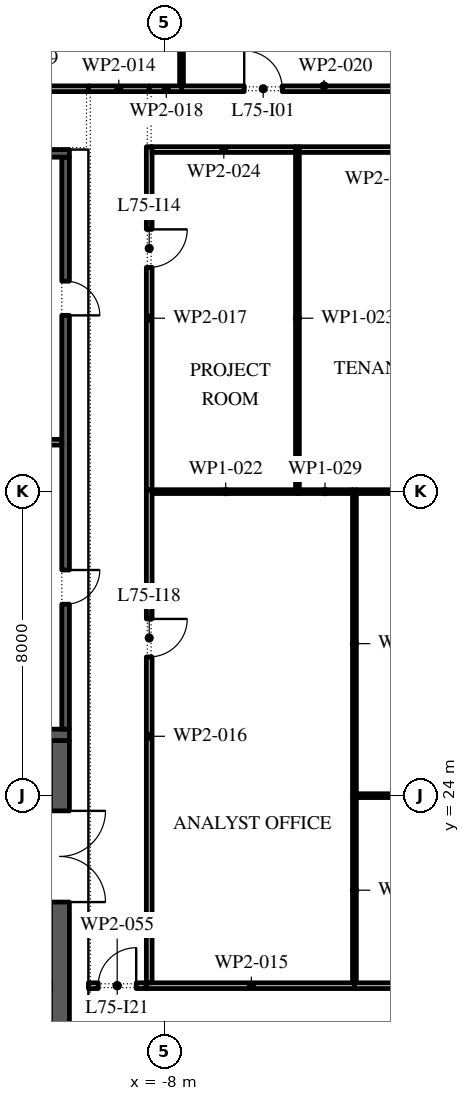
"""IFC4 building model, lengths in metres.
Left out: names, types, materials, properties, quantities, classifications, styles, units other than length and angle.
Written with IfcOpenShell. Run it as: python <this file> out.ifc"""

import sys

from ifc_helpers import new_model, si_unit, direction, frame, frame_2d, origin, place, context, subcontext, project, spatial, rectangle, extrude, element, fill, save


model = new_model("IFC4")
c1 = context("Model", 3, precision=1e-05, world=origin(), true_north=direction((0.0, 1.0)))
c2 = subcontext(c1, "Body", "Model", "MODEL_VIEW")
j1 = project(units=[si_unit("LENGTHUNIT", "METRE"), si_unit("PLANEANGLEUNIT", "RADIAN")], contexts=[c1])
p1 = place(None, origin())
s1 = spatial("IfcSite", under=j1, at=p1, CompositionType="ELEMENT")
p2 = place(p1, origin())
s2 = spatial("IfcBuilding", under=s1, at=p2, CompositionType="ELEMENT")
p3 = place(p2, frame((0.0, 0.0, 342.6)))
s3 = spatial("IfcBuildingStorey", under=s2, at=p3, CompositionType="ELEMENT", Elevation=342.6)
p4 = place(p3, frame((-10.75, -2.45, 0.0), z_axis=(0.0, 0.0, 1.0), x_axis=(0.0, 1.0, 0.0)))
e1 = element("IfcWall", 1, at=p4, inside=s3, PredefinedType="SHEAR", context=c2, shape_type="SweptSolid", body=[
    extrude(rectangle(XDim=27.9, YDim=0.5, at=frame_2d((13.95, 0.0))), origin(), (0.0, 0.0, 1.0), 4.0),
])
p5 = place(p4, frame((23.65, 0.0, 0.0)))
e2 = element("IfcOpeningElement", 2, at=p5, cuts=e1, PredefinedType="OPENING", context=c2, shape_type="SweptSolid", body=[
    extrude(rectangle(XDim=2.4, YDim=2.1, at=frame_2d((1.2, 1.05))), frame((0.0, 0.26, 0.0), z_axis=(0.0, -1.0, 0.0), x_axis=(1.0, 0.0, 0.0)), (0.0, 0.0, 1.0), 0.52),
])
p6 = place(p4, frame((1.087, 0.0, 0.0)))
e3 = element("IfcOpeningElement", 3, at=p6, cuts=e1, PredefinedType="OPENING", context=c2, shape_type="SweptSolid", body=[
    extrude(rectangle(XDim=0.9, YDim=2.1, at=frame_2d((0.45, 1.05))), frame((0.0, 0.26, 0.0), z_axis=(0.0, -1.0, 0.0), x_axis=(1.0, 0.0, 0.0)), (0.0, 0.0, 1.0), 0.52),
])
p7 = place(p4, frame((4.262, 0.0, 0.0)))
e4 = element("IfcOpeningElement", 4, at=p7, cuts=e1, PredefinedType="OPENING", context=c2, shape_type="SweptSolid", body=[
    extrude(rectangle(XDim=1.0, YDim=2.1, at=frame_2d((0.5, 1.05))), frame((0.0, 0.26, 0.0), z_axis=(0.0, -1.0, 0.0), x_axis=(1.0, 0.0, 0.0)), (0.0, 0.0, 1.0), 0.52),
])
p8 = place(p3, frame((-21.5, 25.6, 0.0), z_axis=(0.0, 0.0, 1.0), x_axis=(1.0, 0.0, 0.0)))
e5 = element("IfcWall", 5, at=p8, inside=s3, PredefinedType="SHEAR", context=c2, shape_type="SweptSolid", body=[
    extrude(rectangle(XDim=11.0, YDim=0.3, at=frame_2d((5.5, 0.0))), origin(), (0.0, 0.0, 1.0), 4.0),
])
p9 = place(p3, frame((-10.6, 25.75, 0.0), z_axis=(0.0, 0.0, 1.0), x_axis=(0.0, 1.0, 0.0)))
e6 = element("IfcWall", 6, at=p9, inside=s3, PredefinedType="SHEAR", context=c2, shape_type="SweptSolid", body=[
    extrude(rectangle(XDim=15.05, YDim=0.2, at=frame_2d((7.525, 0.0))), origin(), (0.0, 0.0, 1.0), 4.0),
])
p10 = place(p9, frame((3.288, 0.0, 0.0)))
e7 = element("IfcOpeningElement", 7, at=p10, cuts=e6, PredefinedType="OPENING", context=c2, shape_type="SweptSolid", body=[
    extrude(rectangle(XDim=0.9, YDim=2.1, at=frame_2d((0.45, 1.05))), frame((0.0, 0.11, 0.0), z_axis=(0.0, -1.0, 0.0), x_axis=(1.0, 0.0, 0.0)), (0.0, 0.0, 1.0), 0.22),
])
p11 = place(p9, frame((10.887, 0.0, 0.0)))
e8 = element("IfcOpeningElement", 8, at=p11, cuts=e6, PredefinedType="OPENING", context=c2, shape_type="SweptSolid", body=[
    extrude(rectangle(XDim=0.9, YDim=2.1, at=frame_2d((0.45, 1.05))), frame((0.0, 0.11, 0.0), z_axis=(0.0, -1.0, 0.0), x_axis=(1.0, 0.0, 0.0)), (0.0, 0.0, 1.0), 0.22),
])
p12 = place(p3, frame((-21.5, 40.9, 0.0), z_axis=(0.0, 0.0, 1.0), x_axis=(1.0, 0.0, 0.0)))
e9 = element("IfcWall", 9, at=p12, inside=s3, PredefinedType="SHEAR", context=c2, shape_type="SweptSolid", body=[
    extrude(rectangle(XDim=11.0, YDim=0.2, at=frame_2d((5.5, 0.0))), origin(), (0.0, 0.0, 1.0), 4.0),
])
p13 = place(p3, frame((-21.3, 33.3, 0.0), z_axis=(0.0, 0.0, 1.0), x_axis=(1.0, 0.0, 0.0)))
e10 = element("IfcWall", 10, at=p13, inside=s3, PredefinedType="PARTITIONING", context=c2, shape_type="SweptSolid", body=[
    extrude(rectangle(XDim=10.6, YDim=0.15, at=frame_2d((5.3, 0.0))), origin(), (0.0, 0.0, 1.0), 4.0),
])
p14 = place(p3, frame((-15.1, 42.6, 0.0), z_axis=(0.0, 0.0, 1.0), x_axis=(1.0, 0.0, 0.0)))
e11 = element("IfcWall", 11, at=p14, inside=s3, PredefinedType="PARTITIONING", context=c2, shape_type="SweptSolid", body=[
    extrude(rectangle(XDim=5.1, YDim=0.15, at=frame_2d((2.55, 0.0))), origin(), (0.0, 0.0, 1.0), 4.0),
])
p15 = place(p14, frame((0.95, 0.0, 0.0)))
e12 = element("IfcOpeningElement", 12, at=p15, cuts=e11, PredefinedType="OPENING", context=c2, shape_type="SweptSolid", body=[
    extrude(rectangle(XDim=1.0, YDim=2.1, at=frame_2d((0.5, 1.05))), frame((0.0, 0.085, 0.0), z_axis=(0.0, -1.0, 0.0), x_axis=(1.0, 0.0, 0.0)), (0.0, 0.0, 1.0), 0.17),
])
p16 = place(p3, frame((-10.0, 42.6, 0.0), z_axis=(0.0, 0.0, 1.0), x_axis=(1.0, 0.0, 0.0)))
e13 = element("IfcWall", 13, at=p16, inside=s3, PredefinedType="PARTITIONING", context=c2, shape_type="SweptSolid", body=[
    extrude(rectangle(XDim=1.6, YDim=0.15, at=frame_2d((0.8, 0.0))), origin(), (0.0, 0.0, 1.0), 4.0),
])
p17 = place(p3, frame((-8.475, 19.0, 0.0), z_axis=(0.0, 0.0, 1.0), x_axis=(1.0, 0.0, 0.0)))
e14 = element("IfcWall", 14, at=p17, inside=s3, PredefinedType="PARTITIONING", context=c2, shape_type="SweptSolid", body=[
    extrude(rectangle(XDim=5.525, YDim=0.15, at=frame_2d((2.763, 0.0))), origin(), (0.0, 0.0, 1.0), 4.0),
])
p18 = place(p3, frame((-8.4, 32.05, 0.0), z_axis=(0.0, 0.0, 1.0), x_axis=(0.0, -1.0, 0.0)))
e15 = element("IfcWall", 15, at=p18, inside=s3, PredefinedType="PARTITIONING", context=c2, shape_type="SweptSolid", body=[
    extrude(rectangle(XDim=12.975, YDim=0.15, at=frame_2d((6.488, 0.0))), origin(), (0.0, 0.0, 1.0), 4.0),
])
p19 = place(p18, frame((3.4, 0.0, 0.0)))
e16 = element("IfcOpeningElement", 16, at=p19, cuts=e15, PredefinedType="OPENING", context=c2, shape_type="SweptSolid", body=[
    extrude(rectangle(XDim=1.0, YDim=2.1, at=frame_2d((0.5, 1.05))), frame((0.0, 0.085, 0.0), z_axis=(0.0, -1.0, 0.0), x_axis=(1.0, 0.0, 0.0)), (0.0, 0.0, 1.0), 0.17),
])
p20 = place(p3, frame((-8.4, 41.075, 0.0), z_axis=(0.0, 0.0, 1.0), x_axis=(0.0, -1.0, 0.0)))
e17 = element("IfcWall", 17, at=p20, inside=s3, PredefinedType="PARTITIONING", context=c2, shape_type="SweptSolid", body=[
    extrude(rectangle(XDim=9.025, YDim=0.15, at=frame_2d((4.512, 0.0))), origin(), (0.0, 0.0, 1.0), 4.0),
])
p21 = place(p20, frame((2.175, 0.0, 0.0)))
e18 = element("IfcOpeningElement", 18, at=p21, cuts=e17, PredefinedType="OPENING", context=c2, shape_type="SweptSolid", body=[
    extrude(rectangle(XDim=1.0, YDim=2.1, at=frame_2d((0.5, 1.05))), frame((0.0, 0.085, 0.0), z_axis=(0.0, -1.0, 0.0), x_axis=(1.0, 0.0, 0.0)), (0.0, 0.0, 1.0), 0.17),
])
p22 = place(p3, frame((-8.4, 42.6, 0.0), z_axis=(0.0, 0.0, 1.0), x_axis=(1.0, 0.0, 0.0)))
e19 = element("IfcWall", 19, at=p22, inside=s3, PredefinedType="PARTITIONING", context=c2, shape_type="SweptSolid", body=[
    extrude(rectangle(XDim=0.9, YDim=0.15, at=frame_2d((0.45, 0.0))), origin(), (0.0, 0.0, 1.0), 4.0),
])
p23 = place(p3, frame((-7.55, 42.675, 0.0), z_axis=(0.0, 0.0, 1.0), x_axis=(0.0, 1.0, 0.0)))
e20 = element("IfcWall", 20, at=p23, inside=s3, PredefinedType="PARTITIONING", context=c2, shape_type="SweptSolid", body=[
    extrude(rectangle(XDim=4.775, YDim=0.1, at=frame_2d((2.387, 0.0))), origin(), (0.0, 0.0, 1.0), 3.096),
])
p24 = place(p3, frame((-7.55, 42.6, 0.0), z_axis=(0.0, 0.0, 1.0), x_axis=(1.0, 0.0, 0.0)))
e21 = element("IfcWall", 21, at=p24, inside=s3, PredefinedType="PARTITIONING", context=c2, shape_type="SweptSolid", body=[
    extrude(rectangle(XDim=7.5, YDim=0.15, at=frame_2d((3.75, 0.0))), origin(), (0.0, 0.0, 1.0), 4.0),
])
p25 = place(p24, frame((1.65, 0.0, 0.0)))
e22 = element("IfcOpeningElement", 22, at=p25, cuts=e21, PredefinedType="OPENING", context=c2, shape_type="SweptSolid", body=[
    extrude(rectangle(XDim=1.0, YDim=2.1, at=frame_2d((0.5, 1.05))), frame((0.0, 0.085, 0.0), z_axis=(0.0, -1.0, 0.0), x_axis=(1.0, 0.0, 0.0)), (0.0, 0.0, 1.0), 0.17),
])
p26 = place(p3, frame((-4.45, 32.0, 0.0), z_axis=(0.0, 0.0, 1.0), x_axis=(-1.0, 0.0, 0.0)))
e23 = element("IfcWall", 23, at=p26, inside=s3, PredefinedType="PARTITIONING", context=c2, shape_type="SweptSolid", body=[
    extrude(rectangle(XDim=3.875, YDim=0.1, at=frame_2d((1.938, 0.0))), origin(), (0.0, 0.0, 1.0), 4.0),
])
p27 = place(p3, frame((-4.5, 32.05, 0.0), z_axis=(0.0, 0.0, 1.0), x_axis=(0.0, 1.0, 0.0)))
e24 = element("IfcWall", 24, at=p27, inside=s3, PredefinedType="PARTITIONING", context=c2, shape_type="SweptSolid", body=[
    extrude(rectangle(XDim=9.025, YDim=0.1, at=frame_2d((4.512, 0.0))), origin(), (0.0, 0.0, 1.0), 4.0),
])
p28 = place(p3, frame((-4.55, 41.0, 0.0), z_axis=(0.0, 0.0, 1.0), x_axis=(-1.0, 0.0, 0.0)))
e25 = element("IfcWall", 25, at=p28, inside=s3, PredefinedType="PARTITIONING", context=c2, shape_type="SweptSolid", body=[
    extrude(rectangle(XDim=3.775, YDim=0.15, at=frame_2d((1.887, 0.0))), origin(), (0.0, 0.0, 1.0), 4.0),
])
p29 = place(p3, frame((-3.0, 19.075, 0.0), z_axis=(0.0, 0.0, 1.0), x_axis=(0.0, 1.0, 0.0)))
e26 = element("IfcWall", 26, at=p29, inside=s3, PredefinedType="PARTITIONING", context=c2, shape_type="SweptSolid", body=[
    extrude(rectangle(XDim=4.875, YDim=0.1, at=frame_2d((2.438, 0.0))), origin(), (0.0, 0.0, 1.0), 4.0),
])
p30 = place(p3, frame((-3.0, 19.0, 0.0), z_axis=(0.0, 0.0, 1.0), x_axis=(1.0, 0.0, 0.0)))
e27 = element("IfcWall", 27, at=p30, inside=s3, PredefinedType="PARTITIONING", context=c2, shape_type="SweptSolid", body=[
    extrude(rectangle(XDim=11.475, YDim=0.15, at=frame_2d((5.738, 0.0))), origin(), (0.0, 0.0, 1.0), 4.0),
])
p31 = place(p30, frame((6.25, 0.0, 0.0)))
e28 = element("IfcOpeningElement", 28, at=p31, cuts=e27, PredefinedType="OPENING", context=c2, shape_type="SweptSolid", body=[
    extrude(rectangle(XDim=1.0, YDim=2.1, at=frame_2d((0.5, 1.05))), frame((0.0, 0.085, 0.0), z_axis=(0.0, -1.0, 0.0), x_axis=(1.0, 0.0, 0.0)), (0.0, 0.0, 1.0), 0.17),
])
p32 = place(p3, frame((-3.0, 23.95, 0.0), z_axis=(0.0, 0.0, 1.0), x_axis=(0.0, 1.0, 0.0)))
e29 = element("IfcWall", 29, at=p32, inside=s3, PredefinedType="PARTITIONING", context=c2, shape_type="SweptSolid", body=[
    extrude(rectangle(XDim=8.1, YDim=0.1, at=frame_2d((4.05, 0.0))), origin(), (0.0, 0.0, 1.0), 4.0),
])
p33 = place(p3, frame((-2.95, 24.0, 0.0), z_axis=(0.0, 0.0, 1.0), x_axis=(1.0, 0.0, 0.0)))
e30 = element("IfcWall", 30, at=p33, inside=s3, PredefinedType="PARTITIONING", context=c2, shape_type="SweptSolid", body=[
    extrude(rectangle(XDim=7.0, YDim=0.1, at=frame_2d((3.5, 0.0))), origin(), (0.0, 0.0, 1.0), 4.0),
])
p34 = place(p3, frame((-3.05, 32.0, 0.0), z_axis=(0.0, 0.0, 1.0), x_axis=(-1.0, 0.0, 0.0)))
e31 = element("IfcWall", 31, at=p34, inside=s3, PredefinedType="PARTITIONING", context=c2, shape_type="SweptSolid", body=[
    extrude(rectangle(XDim=1.45, YDim=0.1, at=frame_2d((0.725, 0.0))), origin(), (0.0, 0.0, 1.0), 4.0),
])
p35 = place(p3, frame((1.55, 32.0, 0.0), z_axis=(0.0, 0.0, 1.0), x_axis=(-1.0, 0.0, 0.0)))
e32 = element("IfcWall", 32, at=p35, inside=s3, PredefinedType="PARTITIONING", context=c2, shape_type="SweptSolid", body=[
    extrude(rectangle(XDim=4.5, YDim=0.1, at=frame_2d((2.25, 0.0))), origin(), (0.0, 0.0, 1.0), 4.0),
])
p36 = place(p3, frame((1.45, 41.0, 0.0), z_axis=(0.0, 0.0, 1.0), x_axis=(-1.0, 0.0, 0.0)))
e33 = element("IfcWall", 33, at=p36, inside=s3, PredefinedType="PARTITIONING", context=c2, shape_type="SweptSolid", body=[
    extrude(rectangle(XDim=5.9, YDim=0.15, at=frame_2d((2.95, 0.0))), origin(), (0.0, 0.0, 1.0), 4.0),
])
p37 = place(p36, frame((1.3, 0.0, 0.0)))
e34 = element("IfcOpeningElement", 34, at=p37, cuts=e33, PredefinedType="OPENING", context=c2, shape_type="SweptSolid", body=[
    extrude(rectangle(XDim=1.0, YDim=2.1, at=frame_2d((0.5, 1.05))), frame((0.0, 0.085, 0.0), z_axis=(0.0, -1.0, 0.0), x_axis=(1.0, 0.0, 0.0)), (0.0, 0.0, 1.0), 0.17),
])
p38 = place(p3, frame((-10.0, 19.0, 0.0), z_axis=(0.0, 0.0, 1.0), x_axis=(1.0, 0.0, 0.0)))
e35 = element("IfcWall", 35, at=p38, inside=s3, PredefinedType="PARTITIONING", context=c2, shape_type="SweptSolid", body=[
    extrude(rectangle(XDim=1.515, YDim=0.15, at=frame_2d((0.757, 0.0))), origin(), (0.0, 0.0, 1.0), 4.0),
])
p39 = place(p38, frame((0.258, 0.0, 0.0)))
e36 = element("IfcOpeningElement", 36, at=p39, cuts=e35, PredefinedType="OPENING", context=c2, shape_type="SweptSolid", body=[
    extrude(rectangle(XDim=1.0, YDim=2.1, at=frame_2d((0.5, 1.05))), frame((0.0, 0.085, 0.0), z_axis=(0.0, -1.0, 0.0), x_axis=(1.0, 0.0, 0.0)), (0.0, 0.0, 1.0), 0.17),
])
p40 = place(p5, frame((2.4, 0.0, 0.0), z_axis=(0.0, 0.0, 1.0), x_axis=(-1.0, 0.0, 0.0)))
e37 = element("IfcDoor", 37, at=p40, inside=s3, OperationType="DOUBLE_DOOR_SINGLE_SWING", PredefinedType="DOOR", context=c2, shape_type="SweptSolid", body=[
    extrude(rectangle(XDim=2.4, YDim=2.1, at=frame_2d((1.2, 1.05))), frame((0.0, 0.025, 0.0), z_axis=(0.0, -1.0, 0.0), x_axis=(1.0, 0.0, 0.0)), (0.0, 0.0, 1.0), 0.05),
])
fill(e2, e37)
p41 = place(p10, frame((0.9, 0.15, 0.0), z_axis=(0.0, 0.0, 1.0), x_axis=(-1.0, 0.0, 0.0)))
e38 = element("IfcDoor", 38, at=p41, inside=s3, OperationType="SINGLE_SWING_RIGHT", PredefinedType="DOOR", context=c2, shape_type="SweptSolid", body=[
    extrude(rectangle(XDim=0.9, YDim=2.1, at=frame_2d((0.45, 1.05))), frame((0.0, 0.1, 0.0), z_axis=(0.0, -1.0, 0.0), x_axis=(1.0, 0.0, 0.0)), (0.0, 0.0, 1.0), 0.05),
])
fill(e7, e38)
p42 = place(p11, frame((0.9, 0.15, 0.0), z_axis=(0.0, 0.0, 1.0), x_axis=(-1.0, 0.0, 0.0)))
e39 = element("IfcDoor", 39, at=p42, inside=s3, OperationType="SINGLE_SWING_LEFT", PredefinedType="DOOR", context=c2, shape_type="SweptSolid", body=[
    extrude(rectangle(XDim=0.9, YDim=2.1, at=frame_2d((0.45, 1.05))), frame((0.0, 0.1, 0.0), z_axis=(0.0, -1.0, 0.0), x_axis=(1.0, 0.0, 0.0)), (0.0, 0.0, 1.0), 0.05),
])
fill(e8, e39)
p43 = place(p25, origin())
e40 = element("IfcDoor", 40, at=p43, inside=s3, OperationType="SINGLE_SWING_RIGHT", PredefinedType="DOOR", context=c2, shape_type="SweptSolid", body=[
    extrude(rectangle(XDim=1.0, YDim=2.1, at=frame_2d((0.5, 1.05))), frame((0.0, 0.025, 0.0), z_axis=(0.0, -1.0, 0.0), x_axis=(1.0, 0.0, 0.0)), (0.0, 0.0, 1.0), 0.05),
])
fill(e22, e40)
p44 = place(p21, origin())
e41 = element("IfcDoor", 41, at=p44, inside=s3, OperationType="SINGLE_SWING_RIGHT", PredefinedType="DOOR", context=c2, shape_type="SweptSolid", body=[
    extrude(rectangle(XDim=1.0, YDim=2.1, at=frame_2d((0.5, 1.05))), frame((0.0, 0.025, 0.0), z_axis=(0.0, -1.0, 0.0), x_axis=(1.0, 0.0, 0.0)), (0.0, 0.0, 1.0), 0.05),
])
fill(e18, e41)
p45 = place(p19, origin())
e42 = element("IfcDoor", 42, at=p45, inside=s3, OperationType="SINGLE_SWING_RIGHT", PredefinedType="DOOR", context=c2, shape_type="SweptSolid", body=[
    extrude(rectangle(XDim=1.0, YDim=2.1, at=frame_2d((0.5, 1.05))), frame((0.0, 0.025, 0.0), z_axis=(0.0, -1.0, 0.0), x_axis=(1.0, 0.0, 0.0)), (0.0, 0.0, 1.0), 0.05),
])
fill(e16, e42)
p46 = place(p39, origin())
e43 = element("IfcDoor", 43, at=p46, inside=s3, OperationType="SINGLE_SWING_LEFT", PredefinedType="DOOR", context=c2, shape_type="SweptSolid", body=[
    extrude(rectangle(XDim=1.0, YDim=2.1, at=frame_2d((0.5, 1.05))), frame((0.0, 0.025, 0.0), z_axis=(0.0, -1.0, 0.0), x_axis=(1.0, 0.0, 0.0)), (0.0, 0.0, 1.0), 0.05),
])
fill(e36, e43)
save(model, sys.argv[1])
